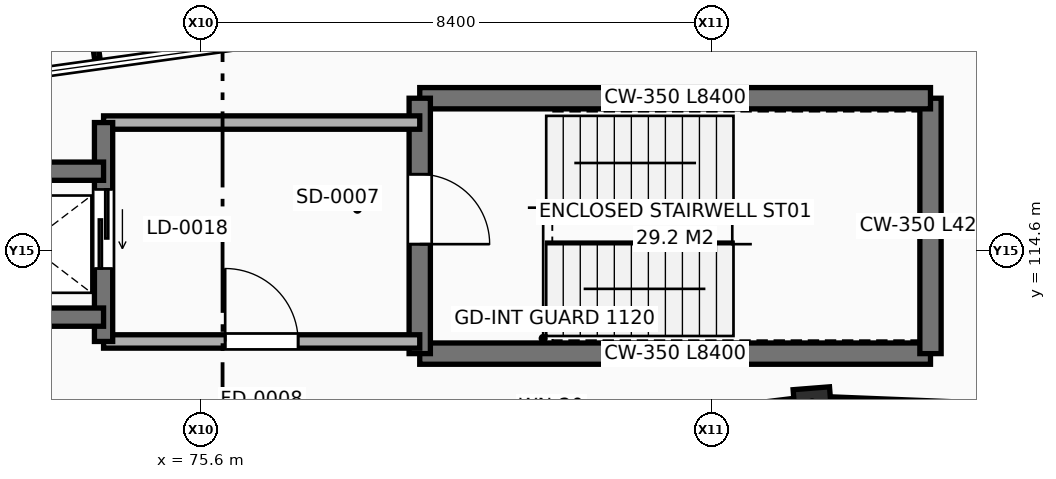
"""IFC4 building model, lengths in metres.
Left out: names, types, materials, properties, quantities, classifications, styles, units other than length and angle.
Written with IfcOpenShell. Run it as: python <this file> out.ifc"""

import sys

from ifc_helpers import new_model, si_unit, direction, frame, frame_2d, origin, origin_2d, place, context, subcontext, project, spatial, rectangle, extrude, element, fill, save


model = new_model("IFC4")
c1 = context("Model", 3, precision=1e-05, world=origin(), true_north=direction((0.0, 1.0)))
c2 = subcontext(c1, "Body", "Model", "MODEL_VIEW")
j1 = project(units=[si_unit("LENGTHUNIT", "METRE"), si_unit("PLANEANGLEUNIT", "RADIAN")], contexts=[c1])
p1 = place(None, origin())
s1 = spatial("IfcSite", under=j1, at=p1, CompositionType="ELEMENT")
p2 = place(p1, origin())
s2 = spatial("IfcBuilding", under=s1, at=p2, CompositionType="ELEMENT")
p3 = place(p2, frame((0.0, 0.0, 13.8)))
s3 = spatial("IfcBuildingStorey", under=s2, at=p3, CompositionType="ELEMENT", Elevation=13.8)
p4 = place(p3, frame((85.664, 112.031, 0.0), z_axis=(0.0, 0.0, 1.0), x_axis=(-0.078459095728, 0.996917333733, 0.0)))
e1 = element("IfcColumn", 1, at=p4, inside=s3, PredefinedType="COLUMN", context=c2, shape_type="SweptSolid", body=[
    extrude(rectangle(XDim=0.6, YDim=0.6, at=origin_2d()), origin(), (0.0, 0.0, 1.0), 4.2),
])
p5 = place(p3, frame((98.971, 111.498, 0.0), z_axis=(0.0, 0.0, 1.0), x_axis=(-0.999198222714, 0.040036380023, 0.0)))
e2 = element("IfcWall", 2, at=p5, inside=s3, PredefinedType="SOLIDWALL", context=c2, shape_type="SweptSolid", body=[
    extrude(rectangle(XDim=12.983, YDim=0.34, at=frame_2d((6.491, 0.0))), origin(), (0.0, 0.0, 1.0), 3.387),
])
p6 = place(p5, frame((3.327, 0.0, 0.9)))
e3 = element("IfcOpeningElement", 3, at=p6, cuts=e2, PredefinedType="OPENING", context=c2, shape_type="SweptSolid", body=[
    extrude(rectangle(XDim=1.5, YDim=1.8, at=frame_2d((0.75, 0.9))), frame((0.0, 0.18, 0.0), z_axis=(0.0, -1.0, 0.0), x_axis=(1.0, 0.0, 0.0)), (0.0, 0.0, 1.0), 0.36),
])
p7 = place(p5, frame((8.155, 0.0, 0.9)))
e4 = element("IfcOpeningElement", 4, at=p7, cuts=e2, PredefinedType="OPENING", context=c2, shape_type="SweptSolid", body=[
    extrude(rectangle(XDim=1.5, YDim=1.8, at=frame_2d((0.75, 0.9))), frame((0.0, 0.18, 0.0), z_axis=(0.0, -1.0, 0.0), x_axis=(1.0, 0.0, 0.0)), (0.0, 0.0, 1.0), 0.36),
])
p8 = place(p3, frame((85.351, 111.993, 0.0), z_axis=(0.0, 0.0, 1.0), x_axis=(-0.992610953185, -0.121340412138, 0.0)))
e5 = element("IfcWall", 5, at=p8, inside=s3, PredefinedType="SOLIDWALL", context=c2, shape_type="SweptSolid", body=[
    extrude(rectangle(XDim=12.738, YDim=0.34, at=frame_2d((6.369, 0.0))), origin(), (0.0, 0.0, 1.0), 3.387),
])
p9 = place(p8, frame((3.079, 0.0, 0.9)))
e6 = element("IfcOpeningElement", 6, at=p9, cuts=e5, PredefinedType="OPENING", context=c2, shape_type="SweptSolid", body=[
    extrude(rectangle(XDim=1.75, YDim=1.8, at=frame_2d((0.875, 0.9))), frame((0.0, 0.18, 0.0), z_axis=(0.0, -1.0, 0.0), x_axis=(1.0, 0.0, 0.0)), (0.0, 0.0, 1.0), 0.36),
])
p10 = place(p8, frame((7.909, 0.0, 0.9)))
e7 = element("IfcOpeningElement", 7, at=p10, cuts=e5, PredefinedType="OPENING", context=c2, shape_type="SweptSolid", body=[
    extrude(rectangle(XDim=1.75, YDim=1.8, at=frame_2d((0.875, 0.9))), frame((0.0, 0.18, 0.0), z_axis=(0.0, -1.0, 0.0), x_axis=(1.0, 0.0, 0.0)), (0.0, 0.0, 1.0), 0.36),
])
p11 = place(p3, frame((79.2, 112.9, 0.0), z_axis=(0.0, 0.0, 1.0), x_axis=(1.0, 0.0, 0.0)))
e8 = element("IfcWall", 8, at=p11, inside=s3, PredefinedType="SHEAR", context=c2, shape_type="SweptSolid", body=[
    extrude(rectangle(XDim=8.4, YDim=0.35, at=frame_2d((4.2, 0.0))), origin(), (0.0, 0.0, 1.0), 3.92),
])
p12 = place(p3, frame((87.6, 112.9, 0.0), z_axis=(0.0, 0.0, 1.0), x_axis=(0.0, 1.0, 0.0)))
e9 = element("IfcWall", 9, at=p12, inside=s3, PredefinedType="SHEAR", context=c2, shape_type="SweptSolid", body=[
    extrude(rectangle(XDim=4.2, YDim=0.35, at=frame_2d((2.1, 0.0))), origin(), (0.0, 0.0, 1.0), 3.92),
])
p13 = place(p3, frame((87.6, 117.1, 0.0), z_axis=(0.0, 0.0, 1.0), x_axis=(-1.0, 0.0, 0.0)))
e10 = element("IfcWall", 10, at=p13, inside=s3, PredefinedType="SHEAR", context=c2, shape_type="SweptSolid", body=[
    extrude(rectangle(XDim=8.4, YDim=0.35, at=frame_2d((4.2, 0.0))), origin(), (0.0, 0.0, 1.0), 3.92),
])
p14 = place(p3, frame((79.2, 117.1, 0.0), z_axis=(0.0, 0.0, 1.0), x_axis=(0.0, -1.0, 0.0)))
e11 = element("IfcWall", 11, at=p14, inside=s3, PredefinedType="SHEAR", context=c2, shape_type="SweptSolid", body=[
    extrude(rectangle(XDim=4.2, YDim=0.35, at=frame_2d((2.1, 0.0))), origin(), (0.0, 0.0, 1.0), 3.92),
])
p15 = place(p14, frame((1.25, 0.0, 0.0)))
e12 = element("IfcOpeningElement", 12, at=p15, cuts=e11, PredefinedType="OPENING", context=c2, shape_type="SweptSolid", body=[
    extrude(rectangle(XDim=1.15, YDim=2.2, at=frame_2d((0.575, 1.1))), frame((0.0, 0.185, 0.0), z_axis=(0.0, -1.0, 0.0), x_axis=(1.0, 0.0, 0.0)), (0.0, 0.0, 1.0), 0.37),
])
p16 = place(p3, frame((74.0, 113.1, 0.0), z_axis=(0.0, 0.0, 1.0), x_axis=(1.0, 0.0, 0.0)))
e13 = element("IfcWall", 13, at=p16, inside=s3, PredefinedType="SOLIDWALL", context=c2, shape_type="SweptSolid", body=[
    extrude(rectangle(XDim=5.2, YDim=0.22, at=frame_2d((2.6, 0.0))), origin(), (0.0, 0.0, 1.0), 3.92),
])
p17 = place(p16, frame((2.0, 0.0, 0.0)))
e14 = element("IfcOpeningElement", 14, at=p17, cuts=e13, PredefinedType="OPENING", context=c2, shape_type="SweptSolid", body=[
    extrude(rectangle(XDim=1.2, YDim=2.2, at=frame_2d((0.6, 1.1))), frame((0.0, 0.12, 0.0), z_axis=(0.0, -1.0, 0.0), x_axis=(1.0, 0.0, 0.0)), (0.0, 0.0, 1.0), 0.24),
])
p18 = place(p3, frame((79.2, 116.7, 0.0), z_axis=(0.0, 0.0, 1.0), x_axis=(-1.0, 0.0, 0.0)))
e15 = element("IfcWall", 15, at=p18, inside=s3, PredefinedType="SOLIDWALL", context=c2, shape_type="SweptSolid", body=[
    extrude(rectangle(XDim=5.2, YDim=0.22, at=frame_2d((2.6, 0.0))), origin(), (0.0, 0.0, 1.0), 3.92),
])
p19 = place(p3, frame((74.0, 116.7, 0.0), z_axis=(0.0, 0.0, 1.0), x_axis=(0.0, -1.0, 0.0)))
e16 = element("IfcWall", 16, at=p19, inside=s3, PredefinedType="SHEAR", context=c2, shape_type="SweptSolid", body=[
    extrude(rectangle(XDim=3.6, YDim=0.3, at=frame_2d((1.8, 0.0))), origin(), (0.0, 0.0, 1.0), 3.92),
])
p20 = place(p19, frame((1.1, 0.0, 0.0)))
e17 = element("IfcOpeningElement", 17, at=p20, cuts=e16, PredefinedType="OPENING", context=c2, shape_type="SweptSolid", body=[
    extrude(rectangle(XDim=1.3, YDim=2.3, at=frame_2d((0.65, 1.15))), frame((0.0, 0.16, 0.0), z_axis=(0.0, -1.0, 0.0), x_axis=(1.0, 0.0, 0.0)), (0.0, 0.0, 1.0), 0.32),
])
for number, where, z_axis, x_axis in (
    (18, (74.0, 115.9, 0.0), (0.0, 0.0, 1.0), (-1.0, 0.0, 0.0)),
    (19, (71.5, 113.5, 0.0), (0.0, 0.0, 1.0), (1.0, 0.0, 0.0)),
):
    element("IfcWall", number, at=place(p3, frame(where, z_axis=z_axis, x_axis=x_axis)), inside=s3, PredefinedType="SHEAR", context=c2, shape_type="SweptSolid", body=[
        extrude(rectangle(XDim=2.5, YDim=0.3, at=frame_2d((1.25, 0.0))), origin(), (0.0, 0.0, 1.0), 3.92),
    ])
p21 = place(p15, origin())
e20 = element("IfcDoor", 20, at=p21, inside=s3, OperationType="SINGLE_SWING_RIGHT", PredefinedType="DOOR", context=c2, shape_type="SweptSolid", body=[
    extrude(rectangle(XDim=1.15, YDim=2.2, at=frame_2d((0.575, 1.1))), frame((0.0, 0.025, 0.0), z_axis=(0.0, -1.0, 0.0), x_axis=(1.0, 0.0, 0.0)), (0.0, 0.0, 1.0), 0.05),
])
fill(e12, e20)
p22 = place(p17, origin())
e21 = element("IfcDoor", 21, at=p22, inside=s3, OperationType="SINGLE_SWING_LEFT", PredefinedType="DOOR", context=c2, shape_type="SweptSolid", body=[
    extrude(rectangle(XDim=1.2, YDim=2.2, at=frame_2d((0.6, 1.1))), frame((0.0, 0.025, 0.0), z_axis=(0.0, -1.0, 0.0), x_axis=(1.0, 0.0, 0.0)), (0.0, 0.0, 1.0), 0.05),
])
fill(e14, e21)
p23 = place(p20, origin())
e22 = element("IfcDoor", 22, at=p23, inside=s3, OperationType="SLIDING_TO_LEFT", PredefinedType="DOOR", context=c2, shape_type="SweptSolid", body=[
    extrude(rectangle(XDim=1.3, YDim=2.3, at=frame_2d((0.65, 1.15))), frame((0.0, 0.025, 0.0), z_axis=(0.0, -1.0, 0.0), x_axis=(1.0, 0.0, 0.0)), (0.0, 0.0, 1.0), 0.05),
])
fill(e17, e22)
save(model, sys.argv[1])
